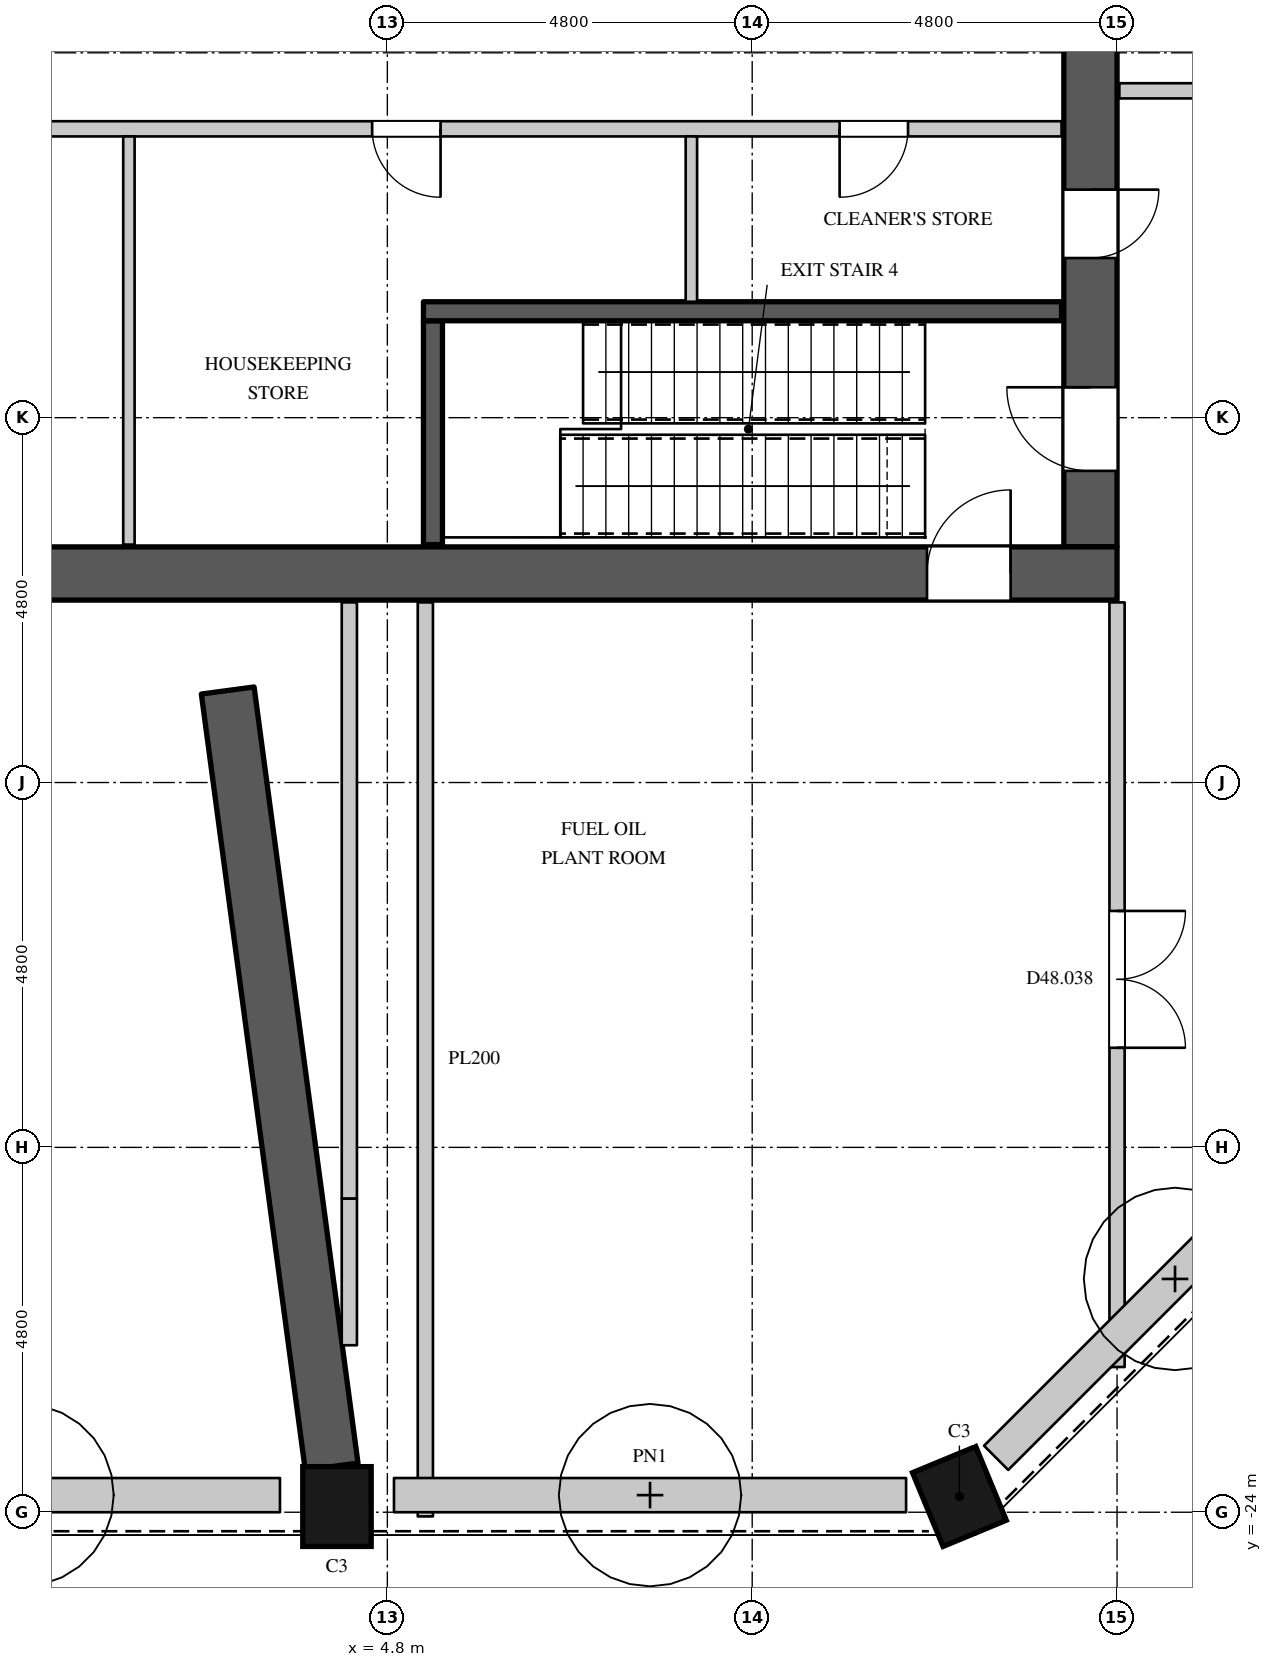
"""IFC4 building model, lengths in metres.
Left out: names, types, materials, properties, quantities, classifications, styles, units other than length and angle.
Written with IfcOpenShell. Run it as: python <this file> out.ifc"""

import sys

from ifc_helpers import new_model, si_unit, direction, frame, frame_2d, origin, origin_2d, place, context, subcontext, project, spatial, rectangle, extrude, element, fill, save


model = new_model("IFC4")
c1 = context("Model", 3, precision=1e-05, world=origin(), true_north=direction((0.0, 1.0)))
c2 = subcontext(c1, "Body", "Model", "MODEL_VIEW")
j1 = project(units=[si_unit("LENGTHUNIT", "METRE"), si_unit("PLANEANGLEUNIT", "RADIAN")], contexts=[c1])
p1 = place(None, origin())
s1 = spatial("IfcSite", under=j1, at=p1, CompositionType="ELEMENT")
p2 = place(p1, origin())
s2 = spatial("IfcBuilding", under=s1, at=p2, CompositionType="ELEMENT")
p3 = place(p2, frame((0.0, 0.0, 208.5)))
s3 = spatial("IfcBuildingStorey", under=s2, at=p3, CompositionType="ELEMENT", Elevation=208.5)
for number, where, z_axis, x_axis in (
    (1, (4.137, -23.925, 0.0), (0.0, 0.0, 1.0), (1.0, 0.0, 0.0)),
    (2, (12.326, -23.793, 0.0), (0.0, 0.0, 1.0), (0.924, 0.383, 0.0)),
):
    element("IfcColumn", number, at=place(p3, frame(where, z_axis=z_axis, x_axis=x_axis)), inside=s3, PredefinedType="COLUMN", context=c2, shape_type="SweptSolid", body=[
        extrude(rectangle(XDim=0.9, YDim=1.05, at=origin_2d()), origin(), (0.0, 0.0, 1.0), 5.4),
    ])
p4 = place(p3, frame((2.7, -13.189, 0.0), z_axis=(0.0, 0.0, 1.0), x_axis=(0.132693057304, -0.991157178526, 0.0)))
e3 = element("IfcWall", 3, at=p4, inside=s3, PredefinedType="SHEAR", context=c2, shape_type="SweptSolid", body=[
    extrude(rectangle(XDim=10.302, YDim=0.7, at=frame_2d((5.151, 0.0))), origin(), (0.0, 0.0, 1.0), 3.35),
])
p5 = place(p3, frame((-3.387, -23.775, 0.0), z_axis=(0.0, 0.0, 1.0), x_axis=(1.0, 0.0, 0.0)))
e4 = element("IfcWall", 4, at=p5, inside=s3, PredefinedType="USERDEFINED", context=c2, shape_type="SweptSolid", body=[
    extrude(rectangle(XDim=6.774, YDim=0.45, at=frame_2d((3.387, 0.0))), origin(), (0.0, 0.0, 1.0), 0.9),
])
p6 = place(p3, frame((4.887, -23.775, 0.0), z_axis=(0.0, 0.0, 1.0), x_axis=(1.0, 0.0, 0.0)))
e5 = element("IfcWall", 5, at=p6, inside=s3, PredefinedType="USERDEFINED", context=c2, shape_type="SweptSolid", body=[
    extrude(rectangle(XDim=6.738, YDim=0.45, at=frame_2d((3.369, 0.0))), origin(), (0.0, 0.0, 1.0), 0.9),
])
p7 = place(p3, frame((12.809, -23.284, 0.0), z_axis=(0.0, 0.0, 1.0), x_axis=(0.707088443593, 0.707125118305, 0.0)))
e6 = element("IfcWall", 6, at=p7, inside=s3, PredefinedType="USERDEFINED", context=c2, shape_type="SweptSolid", body=[
    extrude(rectangle(XDim=6.657, YDim=0.45, at=frame_2d((3.329, 0.0))), origin(), (0.0, 0.0, 1.0), 0.9),
])
p8 = place(p3, frame((-14.4, -11.65, 0.0), z_axis=(0.0, 0.0, 1.0), x_axis=(1.0, 0.0, 0.0)))
e7 = element("IfcWall", 7, at=p8, inside=s3, PredefinedType="SHEAR", context=c2, shape_type="SweptSolid", body=[
    extrude(rectangle(XDim=28.8, YDim=0.7, at=frame_2d((14.4, 0.0))), origin(), (0.0, 0.0, 1.0), 5.4),
])
p9 = place(p8, frame((1.4, 0.0, 0.0)))
e8 = element("IfcOpeningElement", 8, at=p9, cuts=e7, PredefinedType="OPENING", context=c2, shape_type="SweptSolid", body=[
    extrude(rectangle(XDim=1.1, YDim=2.2, at=frame_2d((0.55, 1.1))), frame((0.0, 0.36, 0.0), z_axis=(0.0, -1.0, 0.0), x_axis=(1.0, 0.0, 0.0)), (0.0, 0.0, 1.0), 0.72),
])
p10 = place(p8, frame((26.3, 0.0, 0.0)))
e9 = element("IfcOpeningElement", 9, at=p10, cuts=e7, PredefinedType="OPENING", context=c2, shape_type="SweptSolid", body=[
    extrude(rectangle(XDim=1.1, YDim=2.2, at=frame_2d((0.55, 1.1))), frame((0.0, 0.36, 0.0), z_axis=(0.0, -1.0, 0.0), x_axis=(1.0, 0.0, 0.0)), (0.0, 0.0, 1.0), 0.72),
])
p11 = place(p8, frame((12.05, 0.0, 0.0)))
e10 = element("IfcOpeningElement", 10, at=p11, cuts=e7, PredefinedType="OPENING", context=c2, shape_type="SweptSolid", body=[
    extrude(rectangle(XDim=1.8, YDim=2.4, at=frame_2d((0.9, 1.2))), frame((0.0, 0.36, 0.0), z_axis=(0.0, -1.0, 0.0), x_axis=(1.0, 0.0, 0.0)), (0.0, 0.0, 1.0), 0.72),
])
p12 = place(p3, frame((14.05, -11.3, 0.0), z_axis=(0.0, 0.0, 1.0), x_axis=(0.0, 1.0, 0.0)))
e11 = element("IfcWall", 11, at=p12, inside=s3, PredefinedType="SHEAR", context=c2, shape_type="SweptSolid", body=[
    extrude(rectangle(XDim=22.6, YDim=0.7, at=frame_2d((11.3, 0.0))), origin(), (0.0, 0.0, 1.0), 5.4),
])
p13 = place(p12, frame((20.5, 0.0, 0.0)))
e12 = element("IfcOpeningElement", 12, at=p13, cuts=e11, PredefinedType="OPENING", context=c2, shape_type="SweptSolid", body=[
    extrude(rectangle(XDim=1.1, YDim=2.2, at=frame_2d((0.55, 1.1))), frame((0.0, 0.36, 0.0), z_axis=(0.0, -1.0, 0.0), x_axis=(1.0, 0.0, 0.0)), (0.0, 0.0, 1.0), 0.72),
])
p14 = place(p12, frame((7.25, 0.0, 0.0)))
e13 = element("IfcOpeningElement", 13, at=p14, cuts=e11, PredefinedType="OPENING", context=c2, shape_type="SweptSolid", body=[
    extrude(rectangle(XDim=0.9, YDim=2.2, at=frame_2d((0.45, 1.1))), frame((0.0, 0.36, 0.0), z_axis=(0.0, -1.0, 0.0), x_axis=(1.0, 0.0, 0.0)), (0.0, 0.0, 1.0), 0.72),
])
p15 = place(p12, frame((1.0, 0.0, 0.0)))
e14 = element("IfcOpeningElement", 14, at=p15, cuts=e11, PredefinedType="OPENING", context=c2, shape_type="SweptSolid", body=[
    extrude(rectangle(XDim=1.1, YDim=2.2, at=frame_2d((0.55, 1.1))), frame((0.0, 0.36, 0.0), z_axis=(0.0, -1.0, 0.0), x_axis=(1.0, 0.0, 0.0)), (0.0, 0.0, 1.0), 0.72),
])
p16 = place(p12, frame((3.8, 0.0, 0.0)))
e15 = element("IfcOpeningElement", 15, at=p16, cuts=e11, PredefinedType="OPENING", context=c2, shape_type="SweptSolid", body=[
    extrude(rectangle(XDim=0.9, YDim=2.2, at=frame_2d((0.45, 1.1))), frame((0.0, 0.36, 0.0), z_axis=(0.0, -1.0, 0.0), x_axis=(1.0, 0.0, 0.0)), (0.0, 0.0, 1.0), 0.72),
])
p17 = place(p3, frame((-7.7, -5.8, 0.0), z_axis=(0.0, 0.0, 1.0), x_axis=(1.0, 0.0, 0.0)))
e16 = element("IfcWall", 16, at=p17, inside=s3, PredefinedType="PARTITIONING", context=c2, shape_type="SweptSolid", body=[
    extrude(rectangle(XDim=21.37, YDim=0.2, at=frame_2d((10.685, 0.0))), origin(), (0.0, 0.0, 1.0), 5.15),
])
p18 = place(p17, frame((1.35, 0.0, 0.0)))
e17 = element("IfcOpeningElement", 17, at=p18, cuts=e16, PredefinedType="OPENING", context=c2, shape_type="SweptSolid", body=[
    extrude(rectangle(XDim=0.9, YDim=2.2, at=frame_2d((0.45, 1.1))), frame((0.0, 0.11, 0.0), z_axis=(0.0, -1.0, 0.0), x_axis=(1.0, 0.0, 0.0)), (0.0, 0.0, 1.0), 0.22),
])
p19 = place(p17, frame((5.85, 0.0, 0.0)))
e18 = element("IfcOpeningElement", 18, at=p19, cuts=e16, PredefinedType="OPENING", context=c2, shape_type="SweptSolid", body=[
    extrude(rectangle(XDim=0.9, YDim=2.2, at=frame_2d((0.45, 1.1))), frame((0.0, 0.11, 0.0), z_axis=(0.0, -1.0, 0.0), x_axis=(1.0, 0.0, 0.0)), (0.0, 0.0, 1.0), 0.22),
])
p20 = place(p17, frame((12.3, 0.0, 0.0)))
e19 = element("IfcOpeningElement", 19, at=p20, cuts=e16, PredefinedType="OPENING", context=c2, shape_type="SweptSolid", body=[
    extrude(rectangle(XDim=0.9, YDim=2.2, at=frame_2d((0.45, 1.1))), frame((0.0, 0.11, 0.0), z_axis=(0.0, -1.0, 0.0), x_axis=(1.0, 0.0, 0.0)), (0.0, 0.0, 1.0), 0.22),
])
p21 = place(p17, frame((18.45, 0.0, 0.0)))
e20 = element("IfcOpeningElement", 20, at=p21, cuts=e16, PredefinedType="OPENING", context=c2, shape_type="SweptSolid", body=[
    extrude(rectangle(XDim=0.9, YDim=2.2, at=frame_2d((0.45, 1.1))), frame((0.0, 0.11, 0.0), z_axis=(0.0, -1.0, 0.0), x_axis=(1.0, 0.0, 0.0)), (0.0, 0.0, 1.0), 0.22),
])
p22 = place(p3, frame((1.4, -11.27, 0.0), z_axis=(0.0, 0.0, 1.0), x_axis=(0.0, 1.0, 0.0)))
e21 = element("IfcWall", 21, at=p22, inside=s3, PredefinedType="PARTITIONING", context=c2, shape_type="SweptSolid", body=[
    extrude(rectangle(XDim=5.37, YDim=0.15, at=frame_2d((2.685, 0.0))), origin(), (0.0, 0.0, 1.0), 5.15),
])
p23 = place(p3, frame((8.8, -8.075, 0.0), z_axis=(0.0, 0.0, 1.0), x_axis=(0.0, 1.0, 0.0)))
e22 = element("IfcWall", 22, at=p23, inside=s3, PredefinedType="PARTITIONING", context=c2, shape_type="SweptSolid", body=[
    extrude(rectangle(XDim=2.175, YDim=0.15, at=frame_2d((1.087, 0.0))), origin(), (0.0, 0.0, 1.0), 5.15),
])
p24 = place(p3, frame((4.3, -21.803, 0.0), z_axis=(0.0, 0.0, 1.0), x_axis=(0.0, 1.0, 0.0)))
e23 = element("IfcWall", 23, at=p24, inside=s3, PredefinedType="PARTITIONING", context=c2, shape_type="SweptSolid", body=[
    extrude(rectangle(XDim=1.931, YDim=0.2, at=frame_2d((0.965, 0.0))), origin(), (0.0, 0.0, 1.0), 3.35),
])
p25 = place(p3, frame((4.3, -19.872, 0.0), z_axis=(0.0, 0.0, 1.0), x_axis=(0.0, 1.0, 0.0)))
e24 = element("IfcWall", 24, at=p25, inside=s3, PredefinedType="PARTITIONING", context=c2, shape_type="SweptSolid", body=[
    extrude(rectangle(XDim=7.842, YDim=0.2, at=frame_2d((3.921, 0.0))), origin(), (0.0, 0.0, 1.0), 5.15),
])
p26 = place(p3, frame((5.3, -24.055, 0.0), z_axis=(0.0, 0.0, 1.0), x_axis=(0.0, 1.0, 0.0)))
e25 = element("IfcWall", 25, at=p26, inside=s3, PredefinedType="PARTITIONING", context=c2, shape_type="SweptSolid", body=[
    extrude(rectangle(XDim=12.025, YDim=0.2, at=frame_2d((6.012, 0.0))), origin(), (0.0, 0.0, 1.0), 5.15),
])
p27 = place(p3, frame((14.4, -22.09, 0.0), z_axis=(0.0, 0.0, 1.0), x_axis=(0.0, 1.0, 0.0)))
e26 = element("IfcWall", 26, at=p27, inside=s3, PredefinedType="PARTITIONING", context=c2, shape_type="SweptSolid", body=[
    extrude(rectangle(XDim=10.06, YDim=0.2, at=frame_2d((5.03, 0.0))), origin(), (0.0, 0.0, 1.0), 5.15),
])
p28 = place(p27, frame((4.2, 0.0, 0.0)))
e27 = element("IfcOpeningElement", 27, at=p28, cuts=e26, PredefinedType="OPENING", context=c2, shape_type="SweptSolid", body=[
    extrude(rectangle(XDim=1.8, YDim=2.4, at=frame_2d((0.9, 1.2))), frame((0.0, 0.11, 0.0), z_axis=(0.0, -1.0, 0.0), x_axis=(1.0, 0.0, 0.0)), (0.0, 0.0, 1.0), 0.22),
])
p29 = place(p3, frame((14.43, -5.3, 0.0), z_axis=(0.0, 0.0, 1.0), x_axis=(1.0, 0.0, 0.0)))
e28 = element("IfcWall", 28, at=p29, inside=s3, PredefinedType="PARTITIONING", context=c2, shape_type="SweptSolid", body=[
    extrude(rectangle(XDim=9.625, YDim=0.2, at=frame_2d((4.812, 0.0))), origin(), (0.0, 0.0, 1.0), 5.15),
])
p30 = place(p3, frame((5.4, -11.27, 0.0), z_axis=(0.0, 0.0, 1.0), x_axis=(0.0, 1.0, 0.0)))
e29 = element("IfcWall", 29, at=p30, inside=s3, PredefinedType="SHEAR", context=c2, shape_type="SweptSolid", body=[
    extrude(rectangle(XDim=2.945, YDim=0.25, at=frame_2d((1.473, 0.0))), origin(), (0.0, 0.0, 1.0), 5.15),
])
p31 = place(p3, frame((5.275, -8.2, 0.0), z_axis=(0.0, 0.0, 1.0), x_axis=(1.0, 0.0, 0.0)))
e30 = element("IfcWall", 30, at=p31, inside=s3, PredefinedType="SHEAR", context=c2, shape_type="SweptSolid", body=[
    extrude(rectangle(XDim=8.395, YDim=0.25, at=frame_2d((4.198, 0.0))), origin(), (0.0, 0.0, 1.0), 5.15),
])
p32 = place(p20, origin())
e31 = element("IfcDoor", 31, at=p32, inside=s3, OperationType="SINGLE_SWING_LEFT", PredefinedType="DOOR", context=c2, shape_type="SweptSolid", body=[
    extrude(rectangle(XDim=0.9, YDim=2.2, at=frame_2d((0.45, 1.1))), frame((0.0, 0.025, 0.0), z_axis=(0.0, -1.0, 0.0), x_axis=(1.0, 0.0, 0.0)), (0.0, 0.0, 1.0), 0.05),
])
fill(e19, e31)
p33 = place(p21, origin())
e32 = element("IfcDoor", 32, at=p33, inside=s3, OperationType="SINGLE_SWING_RIGHT", PredefinedType="DOOR", context=c2, shape_type="SweptSolid", body=[
    extrude(rectangle(XDim=0.9, YDim=2.2, at=frame_2d((0.45, 1.1))), frame((0.0, 0.025, 0.0), z_axis=(0.0, -1.0, 0.0), x_axis=(1.0, 0.0, 0.0)), (0.0, 0.0, 1.0), 0.05),
])
fill(e20, e32)
p34 = place(p10, origin())
e33 = element("IfcDoor", 33, at=p34, inside=s3, OperationType="SINGLE_SWING_RIGHT", PredefinedType="DOOR", context=c2, shape_type="SweptSolid", body=[
    extrude(rectangle(XDim=1.1, YDim=2.2, at=frame_2d((0.55, 1.1))), frame((0.0, 0.345, 0.0), z_axis=(0.0, -1.0, 0.0), x_axis=(1.0, 0.0, 0.0)), (0.0, 0.0, 1.0), 0.05),
])
fill(e9, e33)
p35 = place(p15, origin())
e34 = element("IfcDoor", 34, at=p35, inside=s3, OperationType="SINGLE_SWING_RIGHT", PredefinedType="DOOR", context=c2, shape_type="SweptSolid", body=[
    extrude(rectangle(XDim=1.1, YDim=2.2, at=frame_2d((0.55, 1.1))), frame((0.0, 0.345, 0.0), z_axis=(0.0, -1.0, 0.0), x_axis=(1.0, 0.0, 0.0)), (0.0, 0.0, 1.0), 0.05),
])
fill(e14, e34)
p36 = place(p16, origin())
e35 = element("IfcDoor", 35, at=p36, inside=s3, OperationType="SINGLE_SWING_LEFT", PredefinedType="DOOR", context=c2, shape_type="SweptSolid", body=[
    extrude(rectangle(XDim=0.9, YDim=2.2, at=frame_2d((0.45, 1.1))), frame((0.0, -0.295, 0.0), z_axis=(0.0, -1.0, 0.0), x_axis=(1.0, 0.0, 0.0)), (0.0, 0.0, 1.0), 0.05),
])
fill(e15, e35)
p37 = place(p28, origin())
e36 = element("IfcDoor", 36, at=p37, inside=s3, OperationType="DOUBLE_DOOR_SINGLE_SWING", PredefinedType="DOOR", context=c2, shape_type="SweptSolid", body=[
    extrude(rectangle(XDim=1.8, YDim=2.4, at=frame_2d((0.9, 1.2))), frame((0.0, 0.025, 0.0), z_axis=(0.0, -1.0, 0.0), x_axis=(1.0, 0.0, 0.0)), (0.0, 0.0, 1.0), 0.05),
])
fill(e27, e36)
save(model, sys.argv[1])
